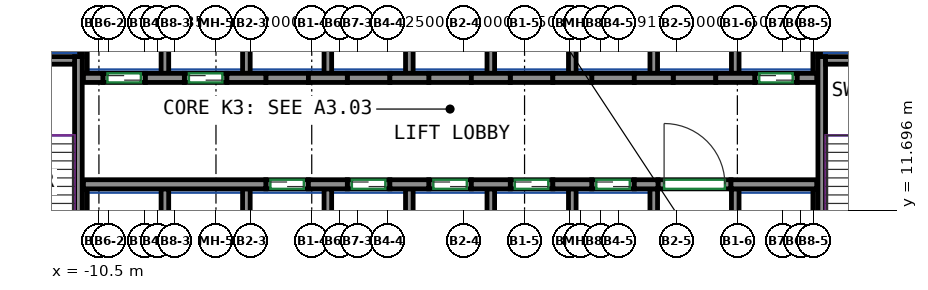
"""IFC4 building model, lengths in metres.
Left out: names, types, materials, properties, quantities, classifications, styles, units other than length and angle.
Written with IfcOpenShell. Run it as: python <this file> out.ifc"""

import sys

from ifc_helpers import new_model, si_unit, direction, frame, frame_2d, origin, place, context, subcontext, project, spatial, rectangle, extrude, source, transform, mapped, element, fill, save


model = new_model("IFC4")
c1 = context("Model", 3, precision=1e-05, world=origin(), true_north=direction((0.0, 1.0)))
c2 = subcontext(c1, "Body", "Model", "MODEL_VIEW")
j1 = project(units=[si_unit("LENGTHUNIT", "METRE"), si_unit("PLANEANGLEUNIT", "RADIAN")], contexts=[c1])
p1 = place(None, origin())
s1 = spatial("IfcSite", under=j1, at=p1, CompositionType="ELEMENT")
p2 = place(p1, origin())
s2 = spatial("IfcBuilding", under=s1, at=p2, CompositionType="ELEMENT")
p3 = place(p2, frame((0.0, 0.0, 13.5)))
s3 = spatial("IfcBuildingStorey", under=s2, at=p3, CompositionType="ELEMENT", Elevation=13.5)
m1 = source(origin(), c2, "Body", "SweptSolid", [
    extrude(rectangle(XDim=7.75, YDim=0.25, at=frame_2d((3.875, 0.0))), origin(), (0.0, 0.0, 1.0), 4.1),
])
p4 = place(p3, frame((-11.175, 9.0, 0.0), z_axis=(0.0, 0.0, 1.0), x_axis=(0.0, 1.0, 0.0)))
e1 = element("IfcWall", 1, at=p4, inside=s3, PredefinedType="SHEAR", context=c2, shape_type="MappedRepresentation", body=[
    mapped(m1, transform((0.0, 0.0, 0.0))),
])
m2 = source(origin(), c2, "Body", "SweptSolid", [
    extrude(rectangle(XDim=3.7, YDim=0.25, at=frame_2d((1.85, 0.0))), origin(), (0.0, 0.0, 1.0), 4.1),
])
p5 = place(p3, frame((-15.0, 16.625, 0.0), z_axis=(0.0, 0.0, 1.0), x_axis=(1.0, 0.0, 0.0)))
e2 = element("IfcWall", 2, at=p5, inside=s3, PredefinedType="SHEAR", context=c2, shape_type="MappedRepresentation", body=[
    mapped(m2, transform((0.0, 0.0, 0.0))),
])
p6 = place(p3, frame((13.275, 9.0, 0.0), z_axis=(0.0, 0.0, 1.0), x_axis=(0.0, 1.0, 0.0)))
e3 = element("IfcWall", 3, at=p6, inside=s3, PredefinedType="SHEAR", context=c2, shape_type="MappedRepresentation", body=[
    mapped(m1, transform((0.0, 0.0, 0.0))),
])
m3 = source(origin(), c2, "Body", "SweptSolid", [
    extrude(rectangle(XDim=3.7, YDim=0.25, at=frame_2d((1.85, 0.0))), origin(), (0.0, 0.0, 1.0), 4.1),
])
p7 = place(p3, frame((13.4, 16.625, 0.0), z_axis=(0.0, 0.0, 1.0), x_axis=(1.0, 0.0, 0.0)))
e4 = element("IfcWall", 4, at=p7, inside=s3, PredefinedType="SHEAR", context=c2, shape_type="MappedRepresentation", body=[
    mapped(m3, transform((0.0, 0.0, 0.0))),
])
m4 = source(origin(), c2, "Body", "SweptSolid", [
    extrude(rectangle(XDim=6.0, YDim=0.3, at=frame_2d((3.0, 0.0))), origin(), (0.0, 0.0, 1.0), 4.1),
])
p8 = place(p3, frame((-11.01, 12.55, 0.0), z_axis=(0.0, 0.0, 1.0), x_axis=(1.0, 0.0, 0.0)))
e5 = element("IfcWall", 5, at=p8, inside=s3, PredefinedType="SHEAR", context=c2, shape_type="MappedRepresentation", body=[
    mapped(m4, transform((0.0, 0.0, 0.0))),
])
m5 = source(origin(), c2, "Body", "SweptSolid", [
    extrude(rectangle(XDim=1.28, YDim=0.3, at=frame_2d((0.64, 0.0))), origin(), (0.0, 0.0, 1.0), 4.1),
])
for number, where, z_axis, x_axis in (
    (6, (-3.61, 12.55, 0.0), (0.0, 0.0, 1.0), (1.0, 0.0, 0.0)),
    (7, (-0.93, 12.55, 0.0), (0.0, 0.0, 1.0), (1.0, 0.0, 0.0)),
    (8, (1.75, 12.55, 0.0), (0.0, 0.0, 1.0), (1.0, 0.0, 0.0)),
    (9, (4.43, 12.55, 0.0), (0.0, 0.0, 1.0), (1.0, 0.0, 0.0)),
):
    element("IfcWall", number, at=place(p3, frame(where, z_axis=z_axis, x_axis=x_axis)), inside=s3, PredefinedType="SHEAR", context=c2, shape_type="MappedRepresentation", body=[
        mapped(m5, transform((0.0, 0.0, 0.0))),
    ])
m6 = source(origin(), c2, "Body", "SweptSolid", [
    extrude(rectangle(XDim=0.78, YDim=0.3, at=frame_2d((0.39, 0.0))), origin(), (0.0, 0.0, 1.0), 4.1),
])
p9 = place(p3, frame((7.11, 12.55, 0.0), z_axis=(0.0, 0.0, 1.0), x_axis=(1.0, 0.0, 0.0)))
e10 = element("IfcWall", 10, at=p9, inside=s3, PredefinedType="SHEAR", context=c2, shape_type="MappedRepresentation", body=[
    mapped(m6, transform((0.0, 0.0, 0.0))),
])
m7 = source(origin(), c2, "Body", "SweptSolid", [
    extrude(rectangle(XDim=2.82, YDim=0.3, at=frame_2d((1.41, 0.0))), origin(), (0.0, 0.0, 1.0), 4.1),
])
p10 = place(p3, frame((10.29, 12.55, 0.0), z_axis=(0.0, 0.0, 1.0), x_axis=(1.0, 0.0, 0.0)))
e11 = element("IfcWall", 11, at=p10, inside=s3, PredefinedType="SHEAR", context=c2, shape_type="MappedRepresentation", body=[
    mapped(m7, transform((0.0, 0.0, 0.0))),
])
m8 = source(origin(), c2, "Body", "SweptSolid", [
    extrude(rectangle(XDim=0.64, YDim=0.3, at=frame_2d((0.32, 0.0))), origin(), (0.0, 0.0, 1.0), 4.1),
])
p11 = place(p3, frame((-11.01, 16.05, 0.0), z_axis=(0.0, 0.0, 1.0), x_axis=(1.0, 0.0, 0.0)))
e12 = element("IfcWall", 12, at=p11, inside=s3, PredefinedType="SHEAR", context=c2, shape_type="MappedRepresentation", body=[
    mapped(m8, transform((0.0, 0.0, 0.0))),
])
for number, where, z_axis, x_axis in (
    (13, (-8.97, 16.05, 0.0), (0.0, 0.0, 1.0), (1.0, 0.0, 0.0)),
    (14, (-6.29, 16.05, 0.0), (0.0, 0.0, 1.0), (1.0, 0.0, 0.0)),
    (15, (-3.61, 16.05, 0.0), (0.0, 0.0, 1.0), (1.0, 0.0, 0.0)),
    (16, (-0.93, 16.05, 0.0), (0.0, 0.0, 1.0), (1.0, 0.0, 0.0)),
    (17, (1.75, 16.05, 0.0), (0.0, 0.0, 1.0), (1.0, 0.0, 0.0)),
    (18, (4.43, 16.05, 0.0), (0.0, 0.0, 1.0), (1.0, 0.0, 0.0)),
):
    element("IfcWall", number, at=place(p3, frame(where, z_axis=z_axis, x_axis=x_axis)), inside=s3, PredefinedType="SHEAR", context=c2, shape_type="MappedRepresentation", body=[
        mapped(m5, transform((0.0, 0.0, 0.0))),
    ])
m9 = source(origin(), c2, "Body", "SweptSolid", [
    extrude(rectangle(XDim=1.28, YDim=0.3, at=frame_2d((0.64, 0.0))), origin(), (0.0, 0.0, 1.0), 4.1),
])
p12 = place(p3, frame((7.11, 16.05, 0.0), z_axis=(0.0, 0.0, 1.0), x_axis=(1.0, 0.0, 0.0)))
e19 = element("IfcWall", 19, at=p12, inside=s3, PredefinedType="SHEAR", context=c2, shape_type="MappedRepresentation", body=[
    mapped(m9, transform((0.0, 0.0, 0.0))),
])
p13 = place(p3, frame((9.79, 16.05, 0.0), z_axis=(0.0, 0.0, 1.0), x_axis=(1.0, 0.0, 0.0)))
e20 = element("IfcWall", 20, at=p13, inside=s3, PredefinedType="SHEAR", context=c2, shape_type="MappedRepresentation", body=[
    mapped(m5, transform((0.0, 0.0, 0.0))),
])
m10 = source(origin(), c2, "Body", "SweptSolid", [
    extrude(rectangle(XDim=0.64, YDim=0.3, at=frame_2d((0.32, 0.0))), origin(), (0.0, 0.0, 1.0), 4.1),
])
p14 = place(p3, frame((12.47, 16.05, 0.0), z_axis=(0.0, 0.0, 1.0), x_axis=(1.0, 0.0, 0.0)))
e21 = element("IfcWall", 21, at=p14, inside=s3, PredefinedType="SHEAR", context=c2, shape_type="MappedRepresentation", body=[
    mapped(m10, transform((0.0, 0.0, 0.0))),
])
m11 = source(origin(), c2, "Body", "SweptSolid", [
    extrude(rectangle(XDim=1.4, YDim=0.3, at=frame_2d((0.7, 0.0))), origin(), (0.0, 0.0, 1.0), 4.1),
])
p15 = place(p3, frame((-5.01, 12.55, 0.0), z_axis=(0.0, 0.0, 1.0), x_axis=(1.0, 0.0, 0.0)))
e22 = element("IfcWall", 22, at=p15, inside=s3, PredefinedType="PARTITIONING", context=c2, shape_type="MappedRepresentation", body=[
    mapped(m11, transform((0.0, 0.0, 0.0))),
])
p16 = place(p15, frame((0.15, 0.0, 0.0)))
e23 = element("IfcOpeningElement", 23, at=p16, cuts=e22, PredefinedType="OPENING", context=c2, shape_type="SweptSolid", body=[
    extrude(rectangle(XDim=1.1, YDim=2.1, at=frame_2d((0.55, 1.05))), frame((0.0, 0.16, 0.0), z_axis=(0.0, -1.0, 0.0), x_axis=(1.0, 0.0, 0.0)), (0.0, 0.0, 1.0), 0.32),
])
m12 = source(origin(), c2, "Body", "SweptSolid", [
    extrude(rectangle(XDim=1.4, YDim=0.3, at=frame_2d((0.7, 0.0))), origin(), (0.0, 0.0, 1.0), 4.1),
])
p17 = place(p3, frame((-2.33, 12.55, 0.0), z_axis=(0.0, 0.0, 1.0), x_axis=(1.0, 0.0, 0.0)))
e24 = element("IfcWall", 24, at=p17, inside=s3, PredefinedType="PARTITIONING", context=c2, shape_type="MappedRepresentation", body=[
    mapped(m12, transform((0.0, 0.0, 0.0))),
])
p18 = place(p17, frame((0.15, 0.0, 0.0)))
e25 = element("IfcOpeningElement", 25, at=p18, cuts=e24, PredefinedType="OPENING", context=c2, shape_type="SweptSolid", body=[
    extrude(rectangle(XDim=1.1, YDim=2.1, at=frame_2d((0.55, 1.05))), frame((0.0, 0.16, 0.0), z_axis=(0.0, -1.0, 0.0), x_axis=(1.0, 0.0, 0.0)), (0.0, 0.0, 1.0), 0.32),
])
p19 = place(p3, frame((0.35, 12.55, 0.0), z_axis=(0.0, 0.0, 1.0), x_axis=(1.0, 0.0, 0.0)))
e26 = element("IfcWall", 26, at=p19, inside=s3, PredefinedType="PARTITIONING", context=c2, shape_type="MappedRepresentation", body=[
    mapped(m11, transform((0.0, 0.0, 0.0))),
])
p20 = place(p19, frame((0.15, 0.0, 0.0)))
e27 = element("IfcOpeningElement", 27, at=p20, cuts=e26, PredefinedType="OPENING", context=c2, shape_type="SweptSolid", body=[
    extrude(rectangle(XDim=1.1, YDim=2.1, at=frame_2d((0.55, 1.05))), frame((0.0, 0.16, 0.0), z_axis=(0.0, -1.0, 0.0), x_axis=(1.0, 0.0, 0.0)), (0.0, 0.0, 1.0), 0.32),
])
p21 = place(p3, frame((3.03, 12.55, 0.0), z_axis=(0.0, 0.0, 1.0), x_axis=(1.0, 0.0, 0.0)))
e28 = element("IfcWall", 28, at=p21, inside=s3, PredefinedType="PARTITIONING", context=c2, shape_type="MappedRepresentation", body=[
    mapped(m11, transform((0.0, 0.0, 0.0))),
])
p22 = place(p21, frame((0.15, 0.0, 0.0)))
e29 = element("IfcOpeningElement", 29, at=p22, cuts=e28, PredefinedType="OPENING", context=c2, shape_type="SweptSolid", body=[
    extrude(rectangle(XDim=1.1, YDim=2.1, at=frame_2d((0.55, 1.05))), frame((0.0, 0.16, 0.0), z_axis=(0.0, -1.0, 0.0), x_axis=(1.0, 0.0, 0.0)), (0.0, 0.0, 1.0), 0.32),
])
p23 = place(p3, frame((5.71, 12.55, 0.0), z_axis=(0.0, 0.0, 1.0), x_axis=(1.0, 0.0, 0.0)))
e30 = element("IfcWall", 30, at=p23, inside=s3, PredefinedType="PARTITIONING", context=c2, shape_type="MappedRepresentation", body=[
    mapped(m12, transform((0.0, 0.0, 0.0))),
])
p24 = place(p23, frame((0.15, 0.0, 0.0)))
e31 = element("IfcOpeningElement", 31, at=p24, cuts=e30, PredefinedType="OPENING", context=c2, shape_type="SweptSolid", body=[
    extrude(rectangle(XDim=1.1, YDim=2.1, at=frame_2d((0.55, 1.05))), frame((0.0, 0.16, 0.0), z_axis=(0.0, -1.0, 0.0), x_axis=(1.0, 0.0, 0.0)), (0.0, 0.0, 1.0), 0.32),
])
p25 = place(p3, frame((11.07, 16.05, 0.0), z_axis=(0.0, 0.0, 1.0), x_axis=(1.0, 0.0, 0.0)))
e32 = element("IfcWall", 32, at=p25, inside=s3, PredefinedType="PARTITIONING", context=c2, shape_type="MappedRepresentation", body=[
    mapped(m11, transform((0.0, 0.0, 0.0))),
])
p26 = place(p25, frame((0.15, 0.0, 0.0)))
e33 = element("IfcOpeningElement", 33, at=p26, cuts=e32, PredefinedType="OPENING", context=c2, shape_type="SweptSolid", body=[
    extrude(rectangle(XDim=1.1, YDim=2.1, at=frame_2d((0.55, 1.05))), frame((0.0, 0.16, 0.0), z_axis=(0.0, -1.0, 0.0), x_axis=(1.0, 0.0, 0.0)), (0.0, 0.0, 1.0), 0.32),
])
p27 = place(p3, frame((-10.37, 16.05, 0.0), z_axis=(0.0, 0.0, 1.0), x_axis=(1.0, 0.0, 0.0)))
e34 = element("IfcWall", 34, at=p27, inside=s3, PredefinedType="PARTITIONING", context=c2, shape_type="MappedRepresentation", body=[
    mapped(m12, transform((0.0, 0.0, 0.0))),
])
p28 = place(p27, frame((0.15, 0.0, 0.0)))
e35 = element("IfcOpeningElement", 35, at=p28, cuts=e34, PredefinedType="OPENING", context=c2, shape_type="SweptSolid", body=[
    extrude(rectangle(XDim=1.1, YDim=2.1, at=frame_2d((0.55, 1.05))), frame((0.0, 0.16, 0.0), z_axis=(0.0, -1.0, 0.0), x_axis=(1.0, 0.0, 0.0)), (0.0, 0.0, 1.0), 0.32),
])
p29 = place(p3, frame((-7.69, 16.05, 0.0), z_axis=(0.0, 0.0, 1.0), x_axis=(1.0, 0.0, 0.0)))
e36 = element("IfcWall", 36, at=p29, inside=s3, PredefinedType="PARTITIONING", context=c2, shape_type="MappedRepresentation", body=[
    mapped(m11, transform((0.0, 0.0, 0.0))),
])
p30 = place(p29, frame((0.15, 0.0, 0.0)))
e37 = element("IfcOpeningElement", 37, at=p30, cuts=e36, PredefinedType="OPENING", context=c2, shape_type="SweptSolid", body=[
    extrude(rectangle(XDim=1.1, YDim=2.1, at=frame_2d((0.55, 1.05))), frame((0.0, 0.16, 0.0), z_axis=(0.0, -1.0, 0.0), x_axis=(1.0, 0.0, 0.0)), (0.0, 0.0, 1.0), 0.32),
])
m13 = source(origin(), c2, "Body", "SweptSolid", [
    extrude(rectangle(XDim=2.4, YDim=0.3, at=frame_2d((1.2, 0.0))), origin(), (0.0, 0.0, 1.0), 4.1),
])
p31 = place(p3, frame((7.89, 12.55, 0.0), z_axis=(0.0, 0.0, 1.0), x_axis=(1.0, 0.0, 0.0)))
e38 = element("IfcWall", 38, at=p31, inside=s3, PredefinedType="PARTITIONING", context=c2, shape_type="MappedRepresentation", body=[
    mapped(m13, transform((0.0, 0.0, 0.0))),
])
p32 = place(p31, frame((0.2, 0.0, 0.0)))
e39 = element("IfcOpeningElement", 39, at=p32, cuts=e38, PredefinedType="OPENING", context=c2, shape_type="SweptSolid", body=[
    extrude(rectangle(XDim=2.0, YDim=2.1, at=frame_2d((1.0, 1.05))), frame((0.0, 0.16, 0.0), z_axis=(0.0, -1.0, 0.0), x_axis=(1.0, 0.0, 0.0)), (0.0, 0.0, 1.0), 0.32),
])
p33 = place(p3, frame((-5.01, 16.05, 0.0), z_axis=(0.0, 0.0, 1.0), x_axis=(1.0, 0.0, 0.0)))
e40 = element("IfcWall", 40, at=p33, inside=s3, PredefinedType="PARTITIONING", context=c2, shape_type="MappedRepresentation", body=[
    mapped(m11, transform((0.0, 0.0, 0.0))),
])
p34 = place(p3, frame((-2.33, 16.05, 0.0), z_axis=(0.0, 0.0, 1.0), x_axis=(1.0, 0.0, 0.0)))
e41 = element("IfcWall", 41, at=p34, inside=s3, PredefinedType="PARTITIONING", context=c2, shape_type="MappedRepresentation", body=[
    mapped(m12, transform((0.0, 0.0, 0.0))),
])
for number, where, z_axis, x_axis in (
    (42, (0.35, 16.05, 0.0), (0.0, 0.0, 1.0), (1.0, 0.0, 0.0)),
    (43, (3.03, 16.05, 0.0), (0.0, 0.0, 1.0), (1.0, 0.0, 0.0)),
):
    element("IfcWall", number, at=place(p3, frame(where, z_axis=z_axis, x_axis=x_axis)), inside=s3, PredefinedType="PARTITIONING", context=c2, shape_type="MappedRepresentation", body=[
        mapped(m11, transform((0.0, 0.0, 0.0))),
    ])
for number, where, z_axis, x_axis in (
    (44, (5.71, 16.05, 0.0), (0.0, 0.0, 1.0), (1.0, 0.0, 0.0)),
    (45, (8.39, 16.05, 0.0), (0.0, 0.0, 1.0), (1.0, 0.0, 0.0)),
):
    element("IfcWall", number, at=place(p3, frame(where, z_axis=z_axis, x_axis=x_axis)), inside=s3, PredefinedType="PARTITIONING", context=c2, shape_type="MappedRepresentation", body=[
        mapped(m12, transform((0.0, 0.0, 0.0))),
    ])
m14 = source(origin(), c2, "Body", "SweptSolid", [
    extrude(rectangle(XDim=3.275, YDim=0.165, at=frame_2d((1.638, 0.0))), origin(), (0.0, 0.0, 1.0), 4.1),
])
for number, where, z_axis, x_axis in (
    (46, (13.067, 16.2, 0.0), (0.0, 0.0, 1.0), (0.0, 1.0, 0.0)),
    (47, (-10.968, 16.2, 0.0), (0.0, 0.0, 1.0), (0.0, 1.0, 0.0)),
):
    element("IfcWall", number, at=place(p3, frame(where, z_axis=z_axis, x_axis=x_axis)), inside=s3, PredefinedType="PARTITIONING", context=c2, shape_type="MappedRepresentation", body=[
        mapped(m14, transform((0.0, 0.0, 0.0))),
    ])
m15 = source(origin(), c2, "Body", "SweptSolid", [
    extrude(rectangle(XDim=3.275, YDim=0.25, at=frame_2d((1.638, 0.0))), origin(), (0.0, 0.0, 1.0), 4.1),
])
p35 = place(p3, frame((10.43, 16.2, 0.0), z_axis=(0.0, 0.0, 1.0), x_axis=(0.0, 1.0, 0.0)))
e48 = element("IfcWall", 48, at=p35, inside=s3, PredefinedType="PARTITIONING", context=c2, shape_type="MappedRepresentation", body=[
    mapped(m15, transform((0.0, 0.0, 0.0))),
])
m16 = source(origin(), c2, "Body", "SweptSolid", [
    extrude(rectangle(XDim=2.725, YDim=0.085, at=frame_2d((1.363, 0.0))), origin(), (0.0, 0.0, 1.0), 4.1),
])
p36 = place(p3, frame((13.192, 16.75, 0.0), z_axis=(0.0, 0.0, 1.0), x_axis=(0.0, 1.0, 0.0)))
e49 = element("IfcWall", 49, at=p36, inside=s3, PredefinedType="PARTITIONING", context=c2, shape_type="MappedRepresentation", body=[
    mapped(m16, transform((0.0, 0.0, 0.0))),
])
for number, where, z_axis, x_axis in (
    (50, (2.39, 16.2, 0.0), (0.0, 0.0, 1.0), (0.0, 1.0, 0.0)),
    (51, (5.07, 16.2, 0.0), (0.0, 0.0, 1.0), (0.0, 1.0, 0.0)),
    (52, (7.75, 16.2, 0.0), (0.0, 0.0, 1.0), (0.0, 1.0, 0.0)),
    (53, (-0.29, 16.2, 0.0), (0.0, 0.0, 1.0), (0.0, 1.0, 0.0)),
):
    element("IfcWall", number, at=place(p3, frame(where, z_axis=z_axis, x_axis=x_axis)), inside=s3, PredefinedType="PARTITIONING", context=c2, shape_type="MappedRepresentation", body=[
        mapped(m15, transform((0.0, 0.0, 0.0))),
    ])
p37 = place(p3, frame((-11.093, 16.75, 0.0), z_axis=(0.0, 0.0, 1.0), x_axis=(0.0, 1.0, 0.0)))
e54 = element("IfcWall", 54, at=p37, inside=s3, PredefinedType="PARTITIONING", context=c2, shape_type="MappedRepresentation", body=[
    mapped(m16, transform((0.0, 0.0, 0.0))),
])
for number, where, z_axis, x_axis in (
    (55, (-2.97, 16.2, 0.0), (0.0, 0.0, 1.0), (0.0, 1.0, 0.0)),
    (56, (-5.65, 16.2, 0.0), (0.0, 0.0, 1.0), (0.0, 1.0, 0.0)),
    (57, (-8.33, 16.2, 0.0), (0.0, 0.0, 1.0), (0.0, 1.0, 0.0)),
):
    element("IfcWall", number, at=place(p3, frame(where, z_axis=z_axis, x_axis=x_axis)), inside=s3, PredefinedType="PARTITIONING", context=c2, shape_type="MappedRepresentation", body=[
        mapped(m15, transform((0.0, 0.0, 0.0))),
    ])
m17 = source(origin(), c2, "Body", "SweptSolid", [
    extrude(rectangle(XDim=3.4, YDim=0.25, at=frame_2d((1.7, 0.0))), origin(), (0.0, 0.0, 1.0), 4.1),
])
p38 = place(p3, frame((10.43, 9.0, 0.0), z_axis=(0.0, 0.0, 1.0), x_axis=(0.0, 1.0, 0.0)))
e58 = element("IfcWall", 58, at=p38, inside=s3, PredefinedType="PARTITIONING", context=c2, shape_type="MappedRepresentation", body=[
    mapped(m17, transform((0.0, 0.0, 0.0))),
])
m18 = source(origin(), c2, "Body", "SweptSolid", [
    extrude(rectangle(XDim=3.4, YDim=0.165, at=frame_2d((1.7, 0.0))), origin(), (0.0, 0.0, 1.0), 4.1),
])
p39 = place(p3, frame((13.067, 9.0, 0.0), z_axis=(0.0, 0.0, 1.0), x_axis=(0.0, 1.0, 0.0)))
e59 = element("IfcWall", 59, at=p39, inside=s3, PredefinedType="PARTITIONING", context=c2, shape_type="MappedRepresentation", body=[
    mapped(m18, transform((0.0, 0.0, 0.0))),
])
for number, where, z_axis, x_axis in (
    (60, (2.39, 9.0, 0.0), (0.0, 0.0, 1.0), (0.0, 1.0, 0.0)),
    (61, (5.07, 9.0, 0.0), (0.0, 0.0, 1.0), (0.0, 1.0, 0.0)),
    (62, (7.75, 9.0, 0.0), (0.0, 0.0, 1.0), (0.0, 1.0, 0.0)),
    (63, (-0.29, 9.0, 0.0), (0.0, 0.0, 1.0), (0.0, 1.0, 0.0)),
):
    element("IfcWall", number, at=place(p3, frame(where, z_axis=z_axis, x_axis=x_axis)), inside=s3, PredefinedType="PARTITIONING", context=c2, shape_type="MappedRepresentation", body=[
        mapped(m17, transform((0.0, 0.0, 0.0))),
    ])
p40 = place(p3, frame((-10.968, 9.0, 0.0), z_axis=(0.0, 0.0, 1.0), x_axis=(0.0, 1.0, 0.0)))
e64 = element("IfcWall", 64, at=p40, inside=s3, PredefinedType="PARTITIONING", context=c2, shape_type="MappedRepresentation", body=[
    mapped(m18, transform((0.0, 0.0, 0.0))),
])
for number, where, z_axis, x_axis in (
    (65, (-2.97, 9.0, 0.0), (0.0, 0.0, 1.0), (0.0, 1.0, 0.0)),
    (66, (-5.65, 9.0, 0.0), (0.0, 0.0, 1.0), (0.0, 1.0, 0.0)),
    (67, (-8.33, 9.0, 0.0), (0.0, 0.0, 1.0), (0.0, 1.0, 0.0)),
):
    element("IfcWall", number, at=place(p3, frame(where, z_axis=z_axis, x_axis=x_axis)), inside=s3, PredefinedType="PARTITIONING", context=c2, shape_type="MappedRepresentation", body=[
        mapped(m17, transform((0.0, 0.0, 0.0))),
    ])
p41 = place(p32, origin())
e68 = element("IfcDoor", 68, at=p41, inside=s3, OperationType="DOUBLE_DOOR_SINGLE_SWING", PredefinedType="DOOR", context=c2, shape_type="SweptSolid", body=[
    extrude(rectangle(XDim=2.0, YDim=2.1, at=frame_2d((1.0, 1.05))), frame((0.0, 0.025, 0.0), z_axis=(0.0, -1.0, 0.0), x_axis=(1.0, 0.0, 0.0)), (0.0, 0.0, 1.0), 0.05),
])
fill(e39, e68)
p42 = place(p16, origin())
e69 = element("IfcDoor", 69, at=p42, inside=s3, OperationType="DOUBLE_DOOR_SLIDING", PredefinedType="DOOR", context=c2, shape_type="SweptSolid", body=[
    extrude(rectangle(XDim=1.1, YDim=2.1, at=frame_2d((0.55, 1.05))), frame((0.0, 0.025, 0.0), z_axis=(0.0, -1.0, 0.0), x_axis=(1.0, 0.0, 0.0)), (0.0, 0.0, 1.0), 0.05),
])
fill(e23, e69)
p43 = place(p18, origin())
e70 = element("IfcDoor", 70, at=p43, inside=s3, OperationType="DOUBLE_DOOR_SLIDING", PredefinedType="DOOR", context=c2, shape_type="SweptSolid", body=[
    extrude(rectangle(XDim=1.1, YDim=2.1, at=frame_2d((0.55, 1.05))), frame((0.0, 0.025, 0.0), z_axis=(0.0, -1.0, 0.0), x_axis=(1.0, 0.0, 0.0)), (0.0, 0.0, 1.0), 0.05),
])
fill(e25, e70)
p44 = place(p20, origin())
e71 = element("IfcDoor", 71, at=p44, inside=s3, OperationType="DOUBLE_DOOR_SLIDING", PredefinedType="DOOR", context=c2, shape_type="SweptSolid", body=[
    extrude(rectangle(XDim=1.1, YDim=2.1, at=frame_2d((0.55, 1.05))), frame((0.0, 0.025, 0.0), z_axis=(0.0, -1.0, 0.0), x_axis=(1.0, 0.0, 0.0)), (0.0, 0.0, 1.0), 0.05),
])
fill(e27, e71)
p45 = place(p22, origin())
e72 = element("IfcDoor", 72, at=p45, inside=s3, OperationType="DOUBLE_DOOR_SLIDING", PredefinedType="DOOR", context=c2, shape_type="SweptSolid", body=[
    extrude(rectangle(XDim=1.1, YDim=2.1, at=frame_2d((0.55, 1.05))), frame((0.0, 0.025, 0.0), z_axis=(0.0, -1.0, 0.0), x_axis=(1.0, 0.0, 0.0)), (0.0, 0.0, 1.0), 0.05),
])
fill(e29, e72)
p46 = place(p24, origin())
e73 = element("IfcDoor", 73, at=p46, inside=s3, OperationType="DOUBLE_DOOR_SLIDING", PredefinedType="DOOR", context=c2, shape_type="SweptSolid", body=[
    extrude(rectangle(XDim=1.1, YDim=2.1, at=frame_2d((0.55, 1.05))), frame((0.0, 0.025, 0.0), z_axis=(0.0, -1.0, 0.0), x_axis=(1.0, 0.0, 0.0)), (0.0, 0.0, 1.0), 0.05),
])
fill(e31, e73)
p47 = place(p26, origin())
e74 = element("IfcDoor", 74, at=p47, inside=s3, OperationType="DOUBLE_DOOR_SLIDING", PredefinedType="DOOR", context=c2, shape_type="SweptSolid", body=[
    extrude(rectangle(XDim=1.1, YDim=2.1, at=frame_2d((0.55, 1.05))), frame((0.0, 0.025, 0.0), z_axis=(0.0, -1.0, 0.0), x_axis=(1.0, 0.0, 0.0)), (0.0, 0.0, 1.0), 0.05),
])
fill(e33, e74)
p48 = place(p28, origin())
e75 = element("IfcDoor", 75, at=p48, inside=s3, OperationType="DOUBLE_DOOR_SLIDING", PredefinedType="DOOR", context=c2, shape_type="SweptSolid", body=[
    extrude(rectangle(XDim=1.1, YDim=2.1, at=frame_2d((0.55, 1.05))), frame((0.0, 0.025, 0.0), z_axis=(0.0, -1.0, 0.0), x_axis=(1.0, 0.0, 0.0)), (0.0, 0.0, 1.0), 0.05),
])
fill(e35, e75)
p49 = place(p30, origin())
e76 = element("IfcDoor", 76, at=p49, inside=s3, OperationType="DOUBLE_DOOR_SLIDING", PredefinedType="DOOR", context=c2, shape_type="SweptSolid", body=[
    extrude(rectangle(XDim=1.1, YDim=2.1, at=frame_2d((0.55, 1.05))), frame((0.0, 0.025, 0.0), z_axis=(0.0, -1.0, 0.0), x_axis=(1.0, 0.0, 0.0)), (0.0, 0.0, 1.0), 0.05),
])
fill(e37, e76)
save(model, sys.argv[1])
